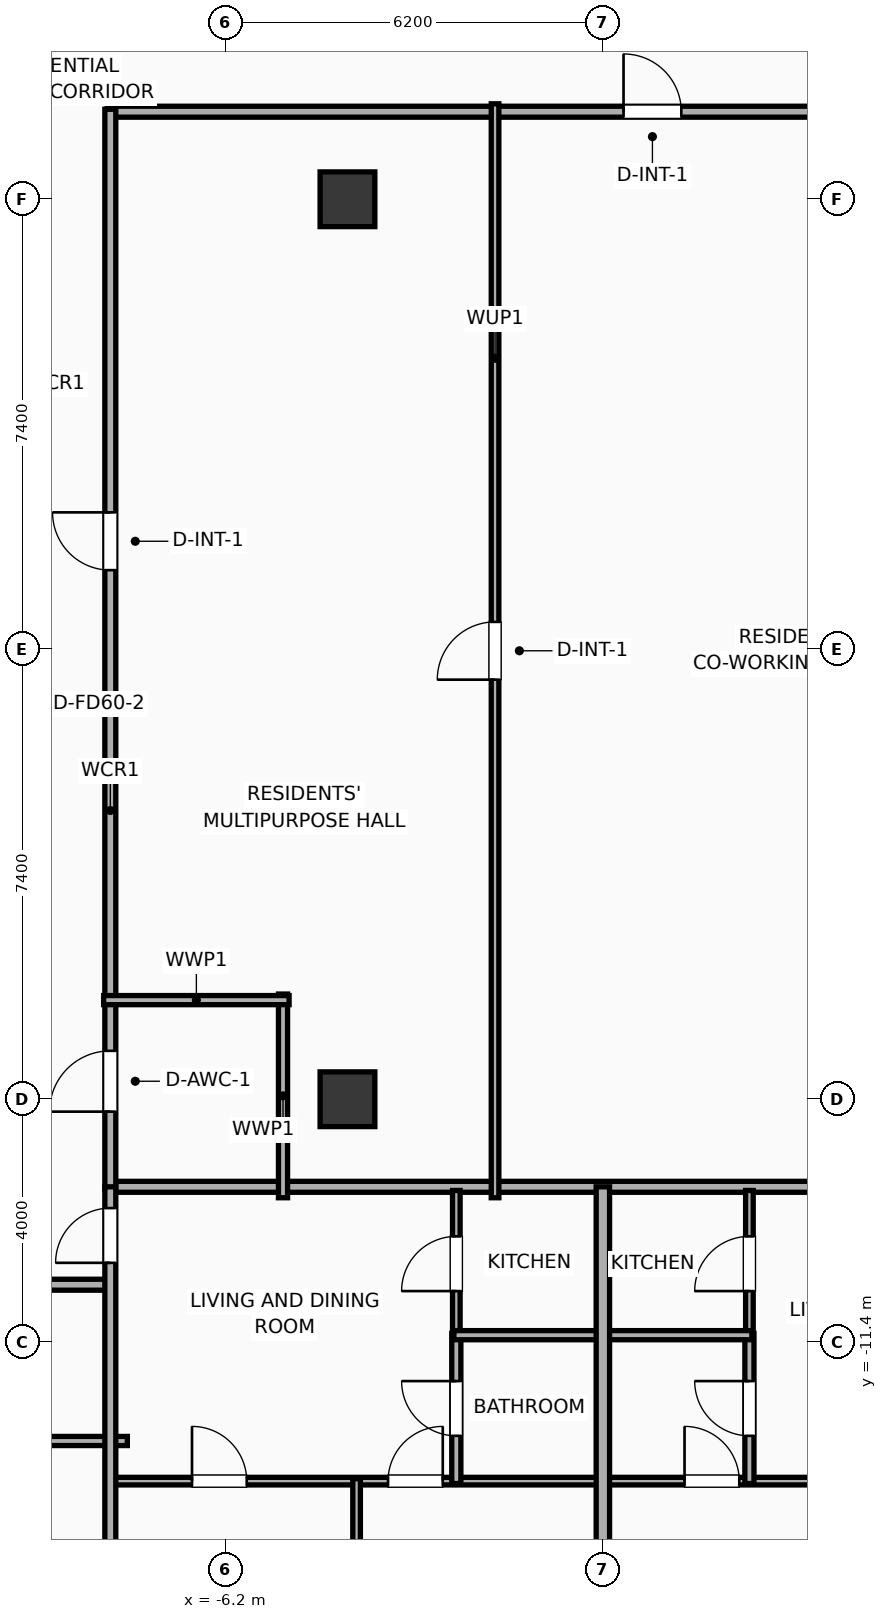
"""IFC4 building model, lengths in metres.
Left out: names, types, materials, properties, quantities, classifications, styles, units other than length and angle.
Written with IfcOpenShell. Run it as: python <this file> out.ifc"""

import sys

from ifc_helpers import new_model, si_unit, direction, frame, frame_2d, origin, origin_2d, place, context, subcontext, project, spatial, rectangle, extrude, element, fill, save


model = new_model("IFC4")
c1 = context("Model", 3, precision=1e-05, world=origin(), true_north=direction((0.0, 1.0)))
c2 = subcontext(c1, "Body", "Model", "MODEL_VIEW")
j1 = project(units=[si_unit("LENGTHUNIT", "METRE"), si_unit("PLANEANGLEUNIT", "RADIAN")], contexts=[c1])
p1 = place(None, origin())
s1 = spatial("IfcSite", under=j1, at=p1, CompositionType="ELEMENT")
p2 = place(p1, origin())
s2 = spatial("IfcBuilding", under=s1, at=p2, CompositionType="ELEMENT")
p3 = place(p2, frame((0.0, 0.0, 250.9)))
s3 = spatial("IfcBuildingStorey", under=s2, at=p3, CompositionType="ELEMENT", Elevation=250.9)
for number, where, z_axis, x_axis in (
    (1, (-4.2, -7.4, 0.0), (0.0, 0.0, 1.0), (1.0, 0.0, 0.0)),
    (2, (-4.2, 7.4, 0.0), (0.0, 0.0, 1.0), (1.0, 0.0, 0.0)),
):
    element("IfcColumn", number, at=place(p3, frame(where, z_axis=z_axis, x_axis=x_axis)), inside=s3, PredefinedType="COLUMN", context=c2, shape_type="SweptSolid", body=[
        extrude(rectangle(XDim=0.9, YDim=0.9, at=origin_2d()), origin(), (0.0, 0.0, 1.0), 3.9),
    ])
p4 = place(p3, frame((-8.15, 8.84, 0.0), z_axis=(0.0, 0.0, 1.0), x_axis=(1.0, 0.0, 0.0)))
e3 = element("IfcWall", 3, at=p4, inside=s3, PredefinedType="PARTITIONING", context=c2, shape_type="SweptSolid", body=[
    extrude(rectangle(XDim=16.3, YDim=0.18, at=frame_2d((8.15, 0.0))), origin(), (0.0, 0.0, 1.0), 3.5),
])
p5 = place(p4, frame((8.49, 0.0, 0.0)))
e4 = element("IfcOpeningElement", 4, at=p5, cuts=e3, PredefinedType="OPENING", context=c2, shape_type="SweptSolid", body=[
    extrude(rectangle(XDim=0.95, YDim=2.05, at=frame_2d((0.475, 1.025))), frame((0.0, 0.1, 0.0), z_axis=(0.0, -1.0, 0.0), x_axis=(1.0, 0.0, 0.0)), (0.0, 0.0, 1.0), 0.2),
])
p6 = place(p3, frame((-8.15, -8.84, 0.0), z_axis=(0.0, 0.0, 1.0), x_axis=(1.0, 0.0, 0.0)))
e5 = element("IfcWall", 5, at=p6, inside=s3, PredefinedType="PARTITIONING", context=c2, shape_type="SweptSolid", body=[
    extrude(rectangle(XDim=16.3, YDim=0.18, at=frame_2d((8.15, 0.0))), origin(), (0.0, 0.0, 1.0), 3.5),
])
p7 = place(p3, frame((-8.1, -8.88, 0.0), z_axis=(0.0, 0.0, 1.0), x_axis=(0.0, 1.0, 0.0)))
e6 = element("IfcWall", 6, at=p7, inside=s3, PredefinedType="PARTITIONING", context=c2, shape_type="SweptSolid", body=[
    extrude(rectangle(XDim=17.76, YDim=0.18, at=frame_2d((8.88, 0.0))), origin(), (0.0, 0.0, 1.0), 3.5),
])
p8 = place(p7, frame((1.276, 0.0, 0.0)))
e7 = element("IfcOpeningElement", 7, at=p8, cuts=e6, PredefinedType="OPENING", context=c2, shape_type="SweptSolid", body=[
    extrude(rectangle(XDim=1.0, YDim=2.05, at=frame_2d((0.5, 1.025))), frame((0.0, 0.1, 0.0), z_axis=(0.0, -1.0, 0.0), x_axis=(1.0, 0.0, 0.0)), (0.0, 0.0, 1.0), 0.2),
])
p9 = place(p7, frame((10.181, 0.0, 0.0)))
e8 = element("IfcOpeningElement", 8, at=p9, cuts=e6, PredefinedType="OPENING", context=c2, shape_type="SweptSolid", body=[
    extrude(rectangle(XDim=0.95, YDim=2.05, at=frame_2d((0.475, 1.025))), frame((0.0, 0.1, 0.0), z_axis=(0.0, -1.0, 0.0), x_axis=(1.0, 0.0, 0.0)), (0.0, 0.0, 1.0), 0.2),
])
p10 = place(p3, frame((-5.26, -9.02, 0.0), z_axis=(0.0, 0.0, 1.0), x_axis=(0.0, 1.0, 0.0)))
e9 = element("IfcWall", 9, at=p10, inside=s3, PredefinedType="PLUMBINGWALL", context=c2, shape_type="SweptSolid", body=[
    extrude(rectangle(XDim=3.35, YDim=0.15, at=frame_2d((1.675, 0.0))), origin(), (0.0, 0.0, 1.0), 3.5),
])
p11 = place(p3, frame((-8.21, -5.77, 0.0), z_axis=(0.0, 0.0, 1.0), x_axis=(1.0, 0.0, 0.0)))
e10 = element("IfcWall", 10, at=p11, inside=s3, PredefinedType="PLUMBINGWALL", context=c2, shape_type="SweptSolid", body=[
    extrude(rectangle(XDim=3.05, YDim=0.15, at=frame_2d((1.525, 0.0))), origin(), (0.0, 0.0, 1.0), 3.5),
])
p12 = place(p3, frame((-1.773, -9.02, 0.0), z_axis=(0.0, 0.0, 1.0), x_axis=(0.0, 1.0, 0.0)))
e11 = element("IfcWall", 11, at=p12, inside=s3, PredefinedType="PARTITIONING", context=c2, shape_type="SweptSolid", body=[
    extrude(rectangle(XDim=17.99, YDim=0.125, at=frame_2d((8.995, 0.0))), origin(), (0.0, 0.0, 1.0), 3.5),
])
p13 = place(p12, frame((8.52, 0.0, 0.0)))
e12 = element("IfcOpeningElement", 12, at=p13, cuts=e11, PredefinedType="OPENING", context=c2, shape_type="SweptSolid", body=[
    extrude(rectangle(XDim=0.95, YDim=2.05, at=frame_2d((0.475, 1.025))), frame((0.0, 0.073, 0.0), z_axis=(0.0, -1.0, 0.0), x_axis=(1.0, 0.0, 0.0)), (0.0, 0.0, 1.0), 0.145),
])
p14 = place(p3, frame((-10.217, -13.02, 0.0), z_axis=(0.0, 0.0, 1.0), x_axis=(1.0, 0.0, 0.0)))
e13 = element("IfcWall", 13, at=p14, inside=s3, PredefinedType="PLUMBINGWALL", context=c2, shape_type="SweptSolid", body=[
    extrude(rectangle(XDim=2.397, YDim=0.15, at=frame_2d((1.198, 0.0))), origin(), (0.0, 0.0, 1.0), 3.5),
])
p15 = place(p3, frame((-26.23, -10.45, 0.0), z_axis=(0.0, 0.0, 1.0), x_axis=(1.0, 0.0, 0.0)))
e14 = element("IfcWall", 14, at=p15, inside=s3, PredefinedType="PARTITIONING", context=c2, shape_type="SweptSolid", body=[
    extrude(rectangle(XDim=18.15, YDim=0.18, at=frame_2d((9.075, 0.0))), origin(), (0.0, 0.0, 1.0), 3.5),
])
p16 = place(p15, frame((2.659, 0.0, 0.0)))
e15 = element("IfcOpeningElement", 15, at=p16, cuts=e14, PredefinedType="OPENING", context=c2, shape_type="SweptSolid", body=[
    extrude(rectangle(XDim=0.9, YDim=2.05, at=frame_2d((0.45, 1.025))), frame((0.0, 0.1, 0.0), z_axis=(0.0, -1.0, 0.0), x_axis=(1.0, 0.0, 0.0)), (0.0, 0.0, 1.0), 0.2),
])
p17 = place(p15, frame((9.654, 0.0, 0.0)))
e16 = element("IfcOpeningElement", 16, at=p17, cuts=e14, PredefinedType="OPENING", context=c2, shape_type="SweptSolid", body=[
    extrude(rectangle(XDim=1.15, YDim=2.05, at=frame_2d((0.575, 1.025))), frame((0.0, 0.1, 0.0), z_axis=(0.0, -1.0, 0.0), x_axis=(1.0, 0.0, 0.0)), (0.0, 0.0, 1.0), 0.2),
])
p18 = place(p15, frame((14.792, 0.0, 0.0)))
e17 = element("IfcOpeningElement", 17, at=p18, cuts=e14, PredefinedType="OPENING", context=c2, shape_type="SweptSolid", body=[
    extrude(rectangle(XDim=0.9, YDim=2.05, at=frame_2d((0.45, 1.025))), frame((0.0, 0.1, 0.0), z_axis=(0.0, -1.0, 0.0), x_axis=(1.0, 0.0, 0.0)), (0.0, 0.0, 1.0), 0.2),
])
p19 = place(p3, frame((-8.08, -13.68, 0.0), z_axis=(0.0, 0.0, 1.0), x_axis=(1.0, 0.0, 0.0)))
e18 = element("IfcWall", 18, at=p19, inside=s3, PredefinedType="PARTITIONING", context=c2, shape_type="SweptSolid", body=[
    extrude(rectangle(XDim=8.06, YDim=0.125, at=frame_2d((4.03, 0.0))), origin(), (0.0, 0.0, 1.0), 3.5),
])
p20 = place(p19, frame((1.323, 0.0, 0.0)))
e19 = element("IfcOpeningElement", 19, at=p20, cuts=e18, PredefinedType="OPENING", context=c2, shape_type="SweptSolid", body=[
    extrude(rectangle(XDim=0.9, YDim=2.05, at=frame_2d((0.45, 1.025))), frame((0.0, 0.073, 0.0), z_axis=(0.0, -1.0, 0.0), x_axis=(1.0, 0.0, 0.0)), (0.0, 0.0, 1.0), 0.145),
])
p21 = place(p19, frame((4.547, 0.0, 0.0)))
e20 = element("IfcOpeningElement", 20, at=p21, cuts=e18, PredefinedType="OPENING", context=c2, shape_type="SweptSolid", body=[
    extrude(rectangle(XDim=0.9, YDim=2.05, at=frame_2d((0.45, 1.025))), frame((0.0, 0.073, 0.0), z_axis=(0.0, -1.0, 0.0), x_axis=(1.0, 0.0, 0.0)), (0.0, 0.0, 1.0), 0.145),
])
p22 = place(p3, frame((-2.41, -11.31, 0.0), z_axis=(0.0, 0.0, 1.0), x_axis=(0.0, 1.0, 0.0)))
e21 = element("IfcWall", 21, at=p22, inside=s3, PredefinedType="PARTITIONING", context=c2, shape_type="SweptSolid", body=[
    extrude(rectangle(XDim=2.41, YDim=0.125, at=frame_2d((1.205, 0.0))), origin(), (0.0, 0.0, 1.0), 3.5),
])
p23 = place(p22, frame((0.755, 0.0, 0.0)))
e22 = element("IfcOpeningElement", 22, at=p23, cuts=e21, PredefinedType="OPENING", context=c2, shape_type="SweptSolid", body=[
    extrude(rectangle(XDim=0.9, YDim=2.05, at=frame_2d((0.45, 1.025))), frame((0.0, 0.073, 0.0), z_axis=(0.0, -1.0, 0.0), x_axis=(1.0, 0.0, 0.0)), (0.0, 0.0, 1.0), 0.145),
])
p24 = place(p3, frame((-2.41, -13.72, 0.0), z_axis=(0.0, 0.0, 1.0), x_axis=(0.0, 1.0, 0.0)))
e23 = element("IfcWall", 23, at=p24, inside=s3, PredefinedType="PLUMBINGWALL", context=c2, shape_type="SweptSolid", body=[
    extrude(rectangle(XDim=2.47, YDim=0.15, at=frame_2d((1.235, 0.0))), origin(), (0.0, 0.0, 1.0), 3.5),
])
p25 = place(p24, frame((0.785, 0.0, 0.0)))
e24 = element("IfcOpeningElement", 24, at=p25, cuts=e23, PredefinedType="OPENING", context=c2, shape_type="SweptSolid", body=[
    extrude(rectangle(XDim=0.9, YDim=2.05, at=frame_2d((0.45, 1.025))), frame((0.0, 0.085, 0.0), z_axis=(0.0, -1.0, 0.0), x_axis=(1.0, 0.0, 0.0)), (0.0, 0.0, 1.0), 0.17),
])
p26 = place(p3, frame((-2.45, -11.28, 0.0), z_axis=(0.0, 0.0, 1.0), x_axis=(1.0, 0.0, 0.0)))
e25 = element("IfcWall", 25, at=p26, inside=s3, PredefinedType="PLUMBINGWALL", context=c2, shape_type="SweptSolid", body=[
    extrude(rectangle(XDim=2.43, YDim=0.15, at=frame_2d((1.215, 0.0))), origin(), (0.0, 0.0, 1.0), 3.5),
])
p27 = place(p3, frame((-4.05, -18.83, 0.0), z_axis=(0.0, 0.0, 1.0), x_axis=(0.0, 1.0, 0.0)))
e26 = element("IfcWall", 26, at=p27, inside=s3, PredefinedType="PARTITIONING", context=c2, shape_type="SweptSolid", body=[
    extrude(rectangle(XDim=5.19, YDim=0.125, at=frame_2d((2.595, 0.0))), origin(), (0.0, 0.0, 1.0), 2.39),
])
p28 = place(p3, frame((-8.1, -18.83, 0.0), z_axis=(0.0, 0.0, 1.0), x_axis=(0.0, 1.0, 0.0)))
e27 = element("IfcWall", 27, at=p28, inside=s3, PredefinedType="PARTITIONING", context=c2, shape_type="SweptSolid", body=[
    extrude(rectangle(XDim=9.99, YDim=0.18, at=frame_2d((4.995, 0.0))), origin(), (0.0, 0.0, 1.0), 3.5),
])
p29 = place(p28, frame((8.74, 0.0, 0.0)))
e28 = element("IfcOpeningElement", 28, at=p29, cuts=e27, PredefinedType="OPENING", context=c2, shape_type="SweptSolid", body=[
    extrude(rectangle(XDim=0.9, YDim=2.05, at=frame_2d((0.45, 1.025))), frame((0.0, 0.1, 0.0), z_axis=(0.0, -1.0, 0.0), x_axis=(1.0, 0.0, 0.0)), (0.0, 0.0, 1.0), 0.2),
])
p30 = place(p3, frame((0.02, -13.68, 0.0), z_axis=(0.0, 0.0, 1.0), x_axis=(1.0, 0.0, 0.0)))
e29 = element("IfcWall", 29, at=p30, inside=s3, PredefinedType="PARTITIONING", context=c2, shape_type="SweptSolid", body=[
    extrude(rectangle(XDim=8.06, YDim=0.125, at=frame_2d((4.03, 0.0))), origin(), (0.0, 0.0, 1.0), 3.5),
])
p31 = place(p30, frame((1.323, 0.0, 0.0)))
e30 = element("IfcOpeningElement", 30, at=p31, cuts=e29, PredefinedType="OPENING", context=c2, shape_type="SweptSolid", body=[
    extrude(rectangle(XDim=0.9, YDim=2.05, at=frame_2d((0.45, 1.025))), frame((0.0, 0.073, 0.0), z_axis=(0.0, -1.0, 0.0), x_axis=(1.0, 0.0, 0.0)), (0.0, 0.0, 1.0), 0.145),
])
p32 = place(p30, frame((5.837, 0.0, 0.0)))
e31 = element("IfcOpeningElement", 31, at=p32, cuts=e29, PredefinedType="OPENING", context=c2, shape_type="SweptSolid", body=[
    extrude(rectangle(XDim=0.9, YDim=2.05, at=frame_2d((0.45, 1.025))), frame((0.0, 0.073, 0.0), z_axis=(0.0, -1.0, 0.0), x_axis=(1.0, 0.0, 0.0)), (0.0, 0.0, 1.0), 0.145),
])
p33 = place(p3, frame((2.41, -11.31, 0.0), z_axis=(0.0, 0.0, 1.0), x_axis=(0.0, 1.0, 0.0)))
e32 = element("IfcWall", 32, at=p33, inside=s3, PredefinedType="PARTITIONING", context=c2, shape_type="SweptSolid", body=[
    extrude(rectangle(XDim=2.41, YDim=0.125, at=frame_2d((1.205, 0.0))), origin(), (0.0, 0.0, 1.0), 2.39),
])
p34 = place(p33, frame((0.755, 0.0, 0.0)))
e33 = element("IfcOpeningElement", 33, at=p34, cuts=e32, PredefinedType="OPENING", context=c2, shape_type="SweptSolid", body=[
    extrude(rectangle(XDim=0.9, YDim=2.05, at=frame_2d((0.45, 1.025))), frame((0.0, 0.073, 0.0), z_axis=(0.0, -1.0, 0.0), x_axis=(1.0, 0.0, 0.0)), (0.0, 0.0, 1.0), 0.145),
])
p35 = place(p3, frame((2.41, -13.72, 0.0), z_axis=(0.0, 0.0, 1.0), x_axis=(0.0, 1.0, 0.0)))
e34 = element("IfcWall", 34, at=p35, inside=s3, PredefinedType="PLUMBINGWALL", context=c2, shape_type="SweptSolid", body=[
    extrude(rectangle(XDim=2.47, YDim=0.15, at=frame_2d((1.235, 0.0))), origin(), (0.0, 0.0, 1.0), 2.39),
])
p36 = place(p35, frame((0.785, 0.0, 0.0)))
e35 = element("IfcOpeningElement", 35, at=p36, cuts=e34, PredefinedType="OPENING", context=c2, shape_type="SweptSolid", body=[
    extrude(rectangle(XDim=0.9, YDim=2.05, at=frame_2d((0.45, 1.025))), frame((0.0, 0.085, 0.0), z_axis=(0.0, -1.0, 0.0), x_axis=(1.0, 0.0, 0.0)), (0.0, 0.0, 1.0), 0.17),
])
p37 = place(p3, frame((0.02, -11.28, 0.0), z_axis=(0.0, 0.0, 1.0), x_axis=(1.0, 0.0, 0.0)))
e36 = element("IfcWall", 36, at=p37, inside=s3, PredefinedType="PLUMBINGWALL", context=c2, shape_type="SweptSolid", body=[
    extrude(rectangle(XDim=2.43, YDim=0.15, at=frame_2d((1.215, 0.0))), origin(), (0.0, 0.0, 1.0), 3.5),
])
p38 = place(p3, frame((0.0, -18.83, 0.0), z_axis=(0.0, 0.0, 1.0), x_axis=(0.0, 1.0, 0.0)))
e37 = element("IfcWall", 37, at=p38, inside=s3, PredefinedType="PARTITIONING", context=c2, shape_type="SweptSolid", body=[
    extrude(rectangle(XDim=9.99, YDim=0.22, at=frame_2d((4.995, 0.0))), origin(), (0.0, 0.0, 1.0), 2.39),
])
p39 = place(p5, origin())
e38 = element("IfcDoor", 38, at=p39, inside=s3, OperationType="SINGLE_SWING_LEFT", PredefinedType="DOOR", context=c2, shape_type="SweptSolid", body=[
    extrude(rectangle(XDim=0.95, YDim=2.05, at=frame_2d((0.475, 1.025))), frame((0.0, 0.025, 0.0), z_axis=(0.0, -1.0, 0.0), x_axis=(1.0, 0.0, 0.0)), (0.0, 0.0, 1.0), 0.05),
])
fill(e4, e38)
p40 = place(p8, origin())
e39 = element("IfcDoor", 39, at=p40, inside=s3, OperationType="SINGLE_SWING_LEFT", PredefinedType="DOOR", context=c2, shape_type="SweptSolid", body=[
    extrude(rectangle(XDim=1.0, YDim=2.05, at=frame_2d((0.5, 1.025))), frame((0.0, 0.025, 0.0), z_axis=(0.0, -1.0, 0.0), x_axis=(1.0, 0.0, 0.0)), (0.0, 0.0, 1.0), 0.05),
])
fill(e7, e39)
p41 = place(p9, origin())
e40 = element("IfcDoor", 40, at=p41, inside=s3, OperationType="SINGLE_SWING_RIGHT", PredefinedType="DOOR", context=c2, shape_type="SweptSolid", body=[
    extrude(rectangle(XDim=0.95, YDim=2.05, at=frame_2d((0.475, 1.025))), frame((0.0, 0.025, 0.0), z_axis=(0.0, -1.0, 0.0), x_axis=(1.0, 0.0, 0.0)), (0.0, 0.0, 1.0), 0.05),
])
fill(e8, e40)
p42 = place(p13, origin())
e41 = element("IfcDoor", 41, at=p42, inside=s3, OperationType="SINGLE_SWING_LEFT", PredefinedType="DOOR", context=c2, shape_type="SweptSolid", body=[
    extrude(rectangle(XDim=0.95, YDim=2.05, at=frame_2d((0.475, 1.025))), frame((0.0, 0.025, 0.0), z_axis=(0.0, -1.0, 0.0), x_axis=(1.0, 0.0, 0.0)), (0.0, 0.0, 1.0), 0.05),
])
fill(e12, e41)
p43 = place(p20, origin())
e42 = element("IfcDoor", 42, at=p43, inside=s3, OperationType="SINGLE_SWING_LEFT", PredefinedType="DOOR", context=c2, shape_type="SweptSolid", body=[
    extrude(rectangle(XDim=0.9, YDim=2.05, at=frame_2d((0.45, 1.025))), frame((0.0, 0.025, 0.0), z_axis=(0.0, -1.0, 0.0), x_axis=(1.0, 0.0, 0.0)), (0.0, 0.0, 1.0), 0.05),
])
fill(e19, e42)
p44 = place(p21, origin())
e43 = element("IfcDoor", 43, at=p44, inside=s3, OperationType="SINGLE_SWING_RIGHT", PredefinedType="DOOR", context=c2, shape_type="SweptSolid", body=[
    extrude(rectangle(XDim=0.9, YDim=2.05, at=frame_2d((0.45, 1.025))), frame((0.0, 0.025, 0.0), z_axis=(0.0, -1.0, 0.0), x_axis=(1.0, 0.0, 0.0)), (0.0, 0.0, 1.0), 0.05),
])
fill(e20, e43)
p45 = place(p23, origin())
e44 = element("IfcDoor", 44, at=p45, inside=s3, OperationType="SINGLE_SWING_LEFT", PredefinedType="DOOR", context=c2, shape_type="SweptSolid", body=[
    extrude(rectangle(XDim=0.9, YDim=2.05, at=frame_2d((0.45, 1.025))), frame((0.0, 0.025, 0.0), z_axis=(0.0, -1.0, 0.0), x_axis=(1.0, 0.0, 0.0)), (0.0, 0.0, 1.0), 0.05),
])
fill(e22, e44)
p46 = place(p25, origin())
e45 = element("IfcDoor", 45, at=p46, inside=s3, OperationType="SINGLE_SWING_RIGHT", PredefinedType="DOOR", context=c2, shape_type="SweptSolid", body=[
    extrude(rectangle(XDim=0.9, YDim=2.05, at=frame_2d((0.45, 1.025))), frame((0.0, 0.025, 0.0), z_axis=(0.0, -1.0, 0.0), x_axis=(1.0, 0.0, 0.0)), (0.0, 0.0, 1.0), 0.05),
])
fill(e24, e45)
p47 = place(p29, origin())
e46 = element("IfcDoor", 46, at=p47, inside=s3, OperationType="SINGLE_SWING_LEFT", PredefinedType="DOOR", context=c2, shape_type="SweptSolid", body=[
    extrude(rectangle(XDim=0.9, YDim=2.05, at=frame_2d((0.45, 1.025))), frame((0.0, 0.025, 0.0), z_axis=(0.0, -1.0, 0.0), x_axis=(1.0, 0.0, 0.0)), (0.0, 0.0, 1.0), 0.05),
])
fill(e28, e46)
p48 = place(p31, origin())
e47 = element("IfcDoor", 47, at=p48, inside=s3, OperationType="SINGLE_SWING_LEFT", PredefinedType="DOOR", context=c2, shape_type="SweptSolid", body=[
    extrude(rectangle(XDim=0.9, YDim=2.05, at=frame_2d((0.45, 1.025))), frame((0.0, 0.025, 0.0), z_axis=(0.0, -1.0, 0.0), x_axis=(1.0, 0.0, 0.0)), (0.0, 0.0, 1.0), 0.05),
])
fill(e30, e47)
p49 = place(p34, origin())
e48 = element("IfcDoor", 48, at=p49, inside=s3, OperationType="SINGLE_SWING_LEFT", PredefinedType="DOOR", context=c2, shape_type="SweptSolid", body=[
    extrude(rectangle(XDim=0.9, YDim=2.05, at=frame_2d((0.45, 1.025))), frame((0.0, 0.025, 0.0), z_axis=(0.0, -1.0, 0.0), x_axis=(1.0, 0.0, 0.0)), (0.0, 0.0, 1.0), 0.05),
])
fill(e33, e48)
p50 = place(p36, origin())
e49 = element("IfcDoor", 49, at=p50, inside=s3, OperationType="SINGLE_SWING_RIGHT", PredefinedType="DOOR", context=c2, shape_type="SweptSolid", body=[
    extrude(rectangle(XDim=0.9, YDim=2.05, at=frame_2d((0.45, 1.025))), frame((0.0, 0.025, 0.0), z_axis=(0.0, -1.0, 0.0), x_axis=(1.0, 0.0, 0.0)), (0.0, 0.0, 1.0), 0.05),
])
fill(e35, e49)
save(model, sys.argv[1])
